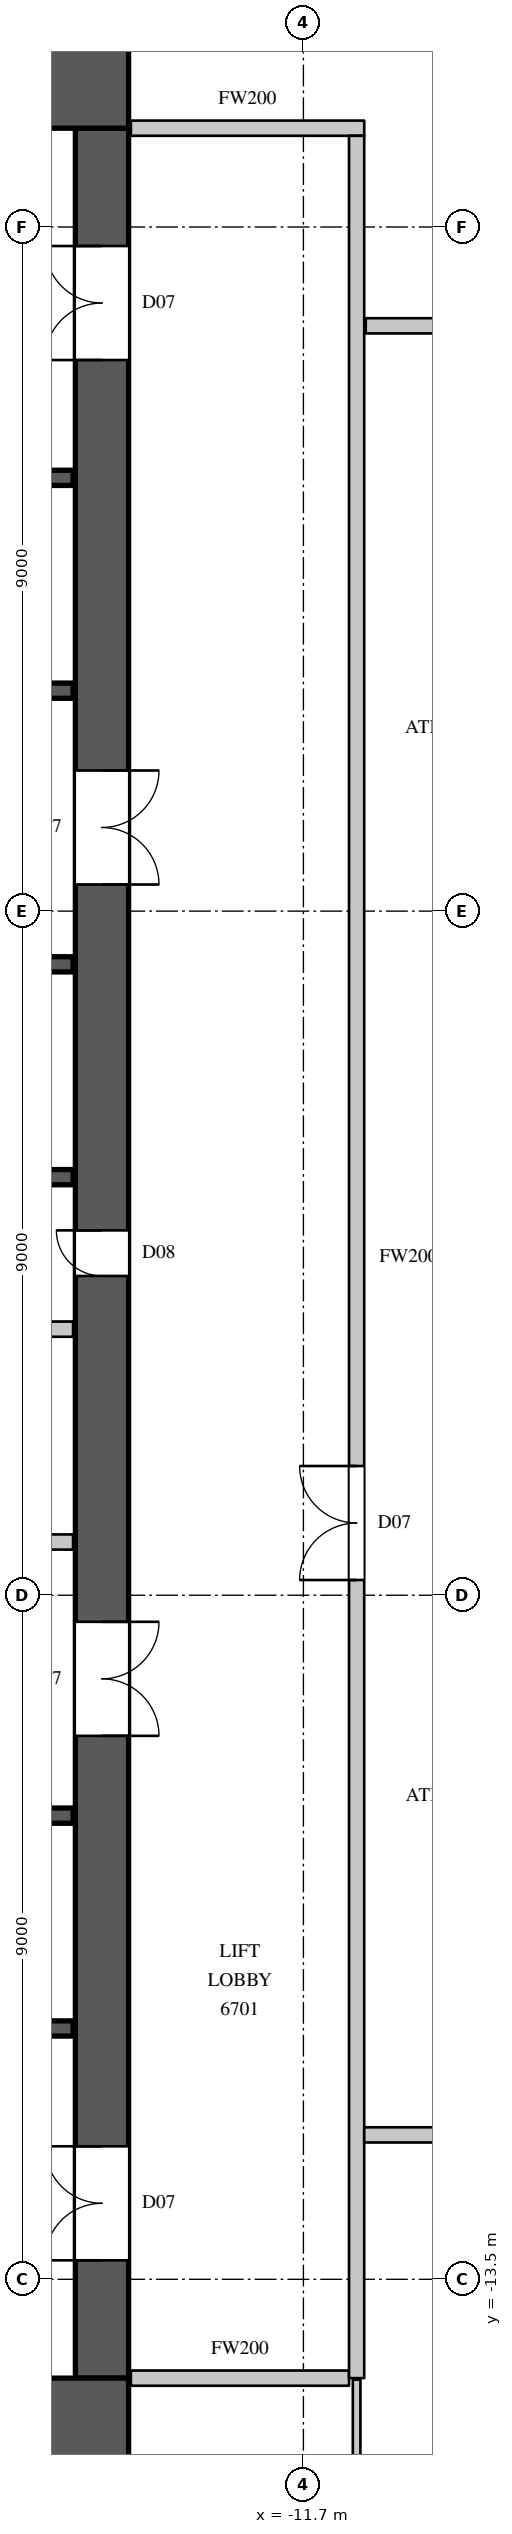
"""IFC4 building model, lengths in metres.
Left out: names, types, materials, properties, quantities, classifications, styles, units other than length and angle.
Written with IfcOpenShell. Run it as: python <this file> out.ifc"""

import sys

from ifc_helpers import new_model, si_unit, direction, frame, frame_2d, origin, place, context, subcontext, project, spatial, rectangle, extrude, element, fill, save


model = new_model("IFC4")
c1 = context("Model", 3, precision=1e-05, world=origin(), true_north=direction((0.0, 1.0)))
c2 = subcontext(c1, "Body", "Model", "MODEL_VIEW")
j1 = project(units=[si_unit("LENGTHUNIT", "METRE"), si_unit("PLANEANGLEUNIT", "RADIAN")], contexts=[c1])
p1 = place(None, origin())
s1 = spatial("IfcSite", under=j1, at=p1, CompositionType="ELEMENT")
p2 = place(p1, origin())
s2 = spatial("IfcBuilding", under=s1, at=p2, CompositionType="ELEMENT")
p3 = place(p2, frame((0.0, 0.0, 296.7)))
s3 = spatial("IfcBuildingStorey", under=s2, at=p3, CompositionType="ELEMENT", Elevation=296.7)
for number, where, z_axis, x_axis in (
    (1, (-30.0, 15.4, 0.0), (0.0, 0.0, 1.0), (1.0, 0.0, 0.0)),
    (2, (-30.0, -15.4, 0.0), (0.0, 0.0, 1.0), (1.0, 0.0, 0.0)),
):
    element("IfcWall", number, at=place(p3, frame(where, z_axis=z_axis, x_axis=x_axis)), inside=s3, PredefinedType="SHEAR", context=c2, shape_type="SweptSolid", body=[
        extrude(rectangle(XDim=16.0, YDim=1.2, at=frame_2d((8.0, 0.0))), origin(), (0.0, 0.0, 1.0), 4.1),
    ])
p4 = place(p3, frame((-14.35, -14.8, 0.0), z_axis=(0.0, 0.0, 1.0), x_axis=(0.0, 1.0, 0.0)))
e3 = element("IfcWall", 3, at=p4, inside=s3, PredefinedType="SHEAR", context=c2, shape_type="SweptSolid", body=[
    extrude(rectangle(XDim=29.6, YDim=0.7, at=frame_2d((14.8, 0.0))), origin(), (0.0, 0.0, 1.0), 4.1),
])
p5 = place(p4, frame((1.55, 0.0, 0.0)))
e4 = element("IfcOpeningElement", 4, at=p5, cuts=e3, PredefinedType="OPENING", context=c2, shape_type="SweptSolid", body=[
    extrude(rectangle(XDim=1.5, YDim=2.4, at=frame_2d((0.75, 1.2))), frame((0.0, 0.36, 0.0), z_axis=(0.0, -1.0, 0.0), x_axis=(1.0, 0.0, 0.0)), (0.0, 0.0, 1.0), 0.72),
])
p6 = place(p4, frame((26.55, 0.0, 0.0)))
e5 = element("IfcOpeningElement", 5, at=p6, cuts=e3, PredefinedType="OPENING", context=c2, shape_type="SweptSolid", body=[
    extrude(rectangle(XDim=1.5, YDim=2.4, at=frame_2d((0.75, 1.2))), frame((0.0, 0.36, 0.0), z_axis=(0.0, -1.0, 0.0), x_axis=(1.0, 0.0, 0.0)), (0.0, 0.0, 1.0), 0.72),
])
p7 = place(p4, frame((8.45, 0.0, 0.0)))
e6 = element("IfcOpeningElement", 6, at=p7, cuts=e3, PredefinedType="OPENING", context=c2, shape_type="SweptSolid", body=[
    extrude(rectangle(XDim=1.5, YDim=2.4, at=frame_2d((0.75, 1.2))), frame((0.0, 0.36, 0.0), z_axis=(0.0, -1.0, 0.0), x_axis=(1.0, 0.0, 0.0)), (0.0, 0.0, 1.0), 0.72),
])
p8 = place(p4, frame((19.65, 0.0, 0.0)))
e7 = element("IfcOpeningElement", 7, at=p8, cuts=e3, PredefinedType="OPENING", context=c2, shape_type="SweptSolid", body=[
    extrude(rectangle(XDim=1.5, YDim=2.4, at=frame_2d((0.75, 1.2))), frame((0.0, 0.36, 0.0), z_axis=(0.0, -1.0, 0.0), x_axis=(1.0, 0.0, 0.0)), (0.0, 0.0, 1.0), 0.72),
])
p9 = place(p4, frame((14.5, 0.0, 0.0)))
e8 = element("IfcOpeningElement", 8, at=p9, cuts=e3, PredefinedType="OPENING", context=c2, shape_type="SweptSolid", body=[
    extrude(rectangle(XDim=0.6, YDim=2.0, at=frame_2d((0.3, 1.0))), frame((0.0, 0.36, 0.0), z_axis=(0.0, -1.0, 0.0), x_axis=(1.0, 0.0, 0.0)), (0.0, 0.0, 1.0), 0.72),
])
p10 = place(p3, frame((-29.27, -3.8, 0.0), z_axis=(0.0, 0.0, 1.0), x_axis=(1.0, 0.0, 0.0)))
e9 = element("IfcWall", 9, at=p10, inside=s3, PredefinedType="PARTITIONING", context=c2, shape_type="SweptSolid", body=[
    extrude(rectangle(XDim=14.54, YDim=0.2, at=frame_2d((7.27, 0.0))), origin(), (0.0, 0.0, 1.0), 3.8),
])
p11 = place(p10, frame((3.25, 0.0, 0.0)))
e10 = element("IfcOpeningElement", 10, at=p11, cuts=e9, PredefinedType="OPENING", context=c2, shape_type="SweptSolid", body=[
    extrude(rectangle(XDim=0.9, YDim=2.2, at=frame_2d((0.45, 1.1))), frame((0.0, 0.11, 0.0), z_axis=(0.0, -1.0, 0.0), x_axis=(1.0, 0.0, 0.0)), (0.0, 0.0, 1.0), 0.22),
])
p12 = place(p10, frame((10.35, 0.0, 0.0)))
e11 = element("IfcOpeningElement", 11, at=p12, cuts=e9, PredefinedType="OPENING", context=c2, shape_type="SweptSolid", body=[
    extrude(rectangle(XDim=0.9, YDim=2.2, at=frame_2d((0.45, 1.1))), frame((0.0, 0.11, 0.0), z_axis=(0.0, -1.0, 0.0), x_axis=(1.0, 0.0, 0.0)), (0.0, 0.0, 1.0), 0.22),
])
p13 = place(p3, frame((-13.97, -14.8, 0.0), z_axis=(0.0, 0.0, 1.0), x_axis=(1.0, 0.0, 0.0)))
e12 = element("IfcWall", 12, at=p13, inside=s3, PredefinedType="PARTITIONING", context=c2, shape_type="SweptSolid", body=[
    extrude(rectangle(XDim=2.87, YDim=0.2, at=frame_2d((1.435, 0.0))), origin(), (0.0, 0.0, 1.0), 3.8),
])
p14 = place(p3, frame((-13.97, 14.8, 0.0), z_axis=(0.0, 0.0, 1.0), x_axis=(1.0, 0.0, 0.0)))
e13 = element("IfcWall", 13, at=p14, inside=s3, PredefinedType="PARTITIONING", context=c2, shape_type="SweptSolid", body=[
    extrude(rectangle(XDim=3.07, YDim=0.2, at=frame_2d((1.535, 0.0))), origin(), (0.0, 0.0, 1.0), 3.8),
])
p15 = place(p3, frame((-11.0, -14.8, 0.0), z_axis=(0.0, 0.0, 1.0), x_axis=(0.0, 1.0, 0.0)))
e14 = element("IfcWall", 14, at=p15, inside=s3, PredefinedType="PARTITIONING", context=c2, shape_type="SweptSolid", body=[
    extrude(rectangle(XDim=29.5, YDim=0.2, at=frame_2d((14.75, 0.0))), origin(), (0.0, 0.0, 1.0), 3.8),
])
p16 = place(p15, frame((10.5, 0.0, 0.0)))
e15 = element("IfcOpeningElement", 15, at=p16, cuts=e14, PredefinedType="OPENING", context=c2, shape_type="SweptSolid", body=[
    extrude(rectangle(XDim=1.5, YDim=2.4, at=frame_2d((0.75, 1.2))), frame((0.0, 0.11, 0.0), z_axis=(0.0, -1.0, 0.0), x_axis=(1.0, 0.0, 0.0)), (0.0, 0.0, 1.0), 0.22),
])
p17 = place(p3, frame((-10.9, -11.6, 0.0), z_axis=(0.0, 0.0, 1.0), x_axis=(1.0, 0.0, 0.0)))
e16 = element("IfcWall", 16, at=p17, inside=s3, PredefinedType="PARTITIONING", context=c2, shape_type="SweptSolid", body=[
    extrude(rectangle(XDim=13.421, YDim=0.2, at=frame_2d((6.71, 0.0))), origin(), (0.0, 0.0, 1.0), 3.8),
])
p18 = place(p17, frame((1.1, 0.0, 0.0)))
e17 = element("IfcOpeningElement", 17, at=p18, cuts=e16, PredefinedType="OPENING", context=c2, shape_type="SweptSolid", body=[
    extrude(rectangle(XDim=0.9, YDim=2.2, at=frame_2d((0.45, 1.1))), frame((0.0, 0.11, 0.0), z_axis=(0.0, -1.0, 0.0), x_axis=(1.0, 0.0, 0.0)), (0.0, 0.0, 1.0), 0.22),
])
p19 = place(p17, frame((4.9, 0.0, 0.0)))
e18 = element("IfcOpeningElement", 18, at=p19, cuts=e16, PredefinedType="OPENING", context=c2, shape_type="SweptSolid", body=[
    extrude(rectangle(XDim=0.9, YDim=2.2, at=frame_2d((0.45, 1.1))), frame((0.0, 0.11, 0.0), z_axis=(0.0, -1.0, 0.0), x_axis=(1.0, 0.0, 0.0)), (0.0, 0.0, 1.0), 0.22),
])
p20 = place(p17, frame((7.25, 0.0, 0.0)))
e19 = element("IfcOpeningElement", 19, at=p20, cuts=e16, PredefinedType="OPENING", context=c2, shape_type="SweptSolid", body=[
    extrude(rectangle(XDim=0.9, YDim=2.2, at=frame_2d((0.45, 1.1))), frame((0.0, 0.11, 0.0), z_axis=(0.0, -1.0, 0.0), x_axis=(1.0, 0.0, 0.0)), (0.0, 0.0, 1.0), 0.22),
])
p21 = place(p17, frame((9.9, 0.0, 0.0)))
e20 = element("IfcOpeningElement", 20, at=p21, cuts=e16, PredefinedType="OPENING", context=c2, shape_type="SweptSolid", body=[
    extrude(rectangle(XDim=1.1, YDim=2.4, at=frame_2d((0.55, 1.2))), frame((0.0, 0.11, 0.0), z_axis=(0.0, -1.0, 0.0), x_axis=(1.0, 0.0, 0.0)), (0.0, 0.0, 1.0), 0.22),
])
p22 = place(p3, frame((-10.88, 12.2, 0.0), z_axis=(0.0, 0.0, 1.0), x_axis=(1.0, 0.0, 0.0)))
e21 = element("IfcWall", 21, at=p22, inside=s3, PredefinedType="PARTITIONING", context=c2, shape_type="SweptSolid", body=[
    extrude(rectangle(XDim=3.736, YDim=0.2, at=frame_2d((1.868, 0.0))), origin(), (0.0, 0.0, 1.0), 3.8),
])
p23 = place(p22, frame((1.9, 0.0, 0.0)))
e22 = element("IfcOpeningElement", 22, at=p23, cuts=e21, PredefinedType="OPENING", context=c2, shape_type="SweptSolid", body=[
    extrude(rectangle(XDim=1.1, YDim=2.4, at=frame_2d((0.55, 1.2))), frame((0.0, 0.11, 0.0), z_axis=(0.0, -1.0, 0.0), x_axis=(1.0, 0.0, 0.0)), (0.0, 0.0, 1.0), 0.22),
])
p24 = place(p3, frame((-29.27, -1.0, 0.0), z_axis=(0.0, 0.0, 1.0), x_axis=(1.0, 0.0, 0.0)))
e23 = element("IfcWall", 23, at=p24, inside=s3, PredefinedType="PARTITIONING", context=c2, shape_type="SweptSolid", body=[
    extrude(rectangle(XDim=14.54, YDim=0.2, at=frame_2d((7.27, 0.0))), origin(), (0.0, 0.0, 1.0), 3.8),
])
p25 = place(p3, frame((-17.92, -10.2, 0.0), z_axis=(0.0, 0.0, 1.0), x_axis=(1.0, 0.0, 0.0)))
e24 = element("IfcWall", 24, at=p25, inside=s3, PredefinedType="SHEAR", context=c2, shape_type="SweptSolid", body=[
    extrude(rectangle(XDim=3.19, YDim=0.2, at=frame_2d((1.595, 0.0))), origin(), (0.0, 0.0, 1.0), 3.8),
])
p26 = place(p25, frame((1.05, 0.0, 0.0)))
e25 = element("IfcOpeningElement", 25, at=p26, cuts=e24, PredefinedType="OPENING", context=c2, shape_type="SweptSolid", body=[
    extrude(rectangle(XDim=1.1, YDim=2.2, at=frame_2d((0.55, 1.1))), frame((0.0, 0.11, 0.0), z_axis=(0.0, -1.0, 0.0), x_axis=(1.0, 0.0, 0.0)), (0.0, 0.0, 1.0), 0.22),
])
p27 = place(p3, frame((-17.92, -7.4, 0.0), z_axis=(0.0, 0.0, 1.0), x_axis=(1.0, 0.0, 0.0)))
e26 = element("IfcWall", 26, at=p27, inside=s3, PredefinedType="SHEAR", context=c2, shape_type="SweptSolid", body=[
    extrude(rectangle(XDim=3.19, YDim=0.2, at=frame_2d((1.595, 0.0))), origin(), (0.0, 0.0, 1.0), 3.8),
])
p28 = place(p3, frame((-17.9, 1.0, 0.0), z_axis=(0.0, 0.0, 1.0), x_axis=(1.0, 0.0, 0.0)))
e27 = element("IfcWall", 27, at=p28, inside=s3, PredefinedType="SHEAR", context=c2, shape_type="SweptSolid", body=[
    extrude(rectangle(XDim=3.17, YDim=0.2, at=frame_2d((1.585, 0.0))), origin(), (0.0, 0.0, 1.0), 3.8),
])
p29 = place(p3, frame((-17.9, 3.8, 0.0), z_axis=(0.0, 0.0, 1.0), x_axis=(1.0, 0.0, 0.0)))
e28 = element("IfcWall", 28, at=p29, inside=s3, PredefinedType="SHEAR", context=c2, shape_type="SweptSolid", body=[
    extrude(rectangle(XDim=3.17, YDim=0.2, at=frame_2d((1.585, 0.0))), origin(), (0.0, 0.0, 1.0), 3.8),
])
p30 = place(p29, frame((1.05, 0.0, 0.0)))
e29 = element("IfcOpeningElement", 29, at=p30, cuts=e28, PredefinedType="OPENING", context=c2, shape_type="SweptSolid", body=[
    extrude(rectangle(XDim=1.1, YDim=2.2, at=frame_2d((0.55, 1.1))), frame((0.0, 0.11, 0.0), z_axis=(0.0, -1.0, 0.0), x_axis=(1.0, 0.0, 0.0)), (0.0, 0.0, 1.0), 0.22),
])
p31 = place(p3, frame((-17.92, 7.4, 0.0), z_axis=(0.0, 0.0, 1.0), x_axis=(1.0, 0.0, 0.0)))
e30 = element("IfcWall", 30, at=p31, inside=s3, PredefinedType="SHEAR", context=c2, shape_type="SweptSolid", body=[
    extrude(rectangle(XDim=3.19, YDim=0.2, at=frame_2d((1.595, 0.0))), origin(), (0.0, 0.0, 1.0), 3.8),
])
p32 = place(p3, frame((-17.92, 10.2, 0.0), z_axis=(0.0, 0.0, 1.0), x_axis=(1.0, 0.0, 0.0)))
e31 = element("IfcWall", 31, at=p32, inside=s3, PredefinedType="SHEAR", context=c2, shape_type="SweptSolid", body=[
    extrude(rectangle(XDim=3.19, YDim=0.2, at=frame_2d((1.595, 0.0))), origin(), (0.0, 0.0, 1.0), 3.8),
])
p33 = place(p32, frame((1.05, 0.0, 0.0)))
e32 = element("IfcOpeningElement", 32, at=p33, cuts=e31, PredefinedType="OPENING", context=c2, shape_type="SweptSolid", body=[
    extrude(rectangle(XDim=1.1, YDim=2.2, at=frame_2d((0.55, 1.1))), frame((0.0, 0.11, 0.0), z_axis=(0.0, -1.0, 0.0), x_axis=(1.0, 0.0, 0.0)), (0.0, 0.0, 1.0), 0.22),
])
p34 = place(p3, frame((-11.0, -23.757, 0.0), z_axis=(0.0, 0.0, 1.0), x_axis=(0.0, 1.0, 0.0)))
e33 = element("IfcWall", 33, at=p34, inside=s3, PredefinedType="PARTITIONING", context=c2, shape_type="SweptSolid", body=[
    extrude(rectangle(XDim=8.937, YDim=0.1, at=frame_2d((4.468, 0.0))), origin(), (0.0, 0.0, 1.0), 3.8),
])
p35 = place(p16, origin())
e34 = element("IfcDoor", 34, at=p35, inside=s3, OperationType="DOUBLE_DOOR_SINGLE_SWING", PredefinedType="DOOR", context=c2, shape_type="SweptSolid", body=[
    extrude(rectangle(XDim=1.5, YDim=2.4, at=frame_2d((0.75, 1.2))), frame((0.0, 0.025, 0.0), z_axis=(0.0, -1.0, 0.0), x_axis=(1.0, 0.0, 0.0)), (0.0, 0.0, 1.0), 0.05),
])
fill(e15, e34)
p36 = place(p5, origin())
e35 = element("IfcDoor", 35, at=p36, inside=s3, OperationType="DOUBLE_DOOR_SINGLE_SWING", PredefinedType="DOOR", context=c2, shape_type="SweptSolid", body=[
    extrude(rectangle(XDim=1.5, YDim=2.4, at=frame_2d((0.75, 1.2))), frame((0.0, 0.345, 0.0), z_axis=(0.0, -1.0, 0.0), x_axis=(1.0, 0.0, 0.0)), (0.0, 0.0, 1.0), 0.05),
])
fill(e4, e35)
p37 = place(p6, origin())
e36 = element("IfcDoor", 36, at=p37, inside=s3, OperationType="DOUBLE_DOOR_SINGLE_SWING", PredefinedType="DOOR", context=c2, shape_type="SweptSolid", body=[
    extrude(rectangle(XDim=1.5, YDim=2.4, at=frame_2d((0.75, 1.2))), frame((0.0, 0.345, 0.0), z_axis=(0.0, -1.0, 0.0), x_axis=(1.0, 0.0, 0.0)), (0.0, 0.0, 1.0), 0.05),
])
fill(e5, e36)
p38 = place(p7, origin())
e37 = element("IfcDoor", 37, at=p38, inside=s3, OperationType="DOUBLE_DOOR_SINGLE_SWING", PredefinedType="DOOR", context=c2, shape_type="SweptSolid", body=[
    extrude(rectangle(XDim=1.5, YDim=2.4, at=frame_2d((0.75, 1.2))), frame((0.0, -0.295, 0.0), z_axis=(0.0, -1.0, 0.0), x_axis=(1.0, 0.0, 0.0)), (0.0, 0.0, 1.0), 0.05),
])
fill(e6, e37)
p39 = place(p8, origin())
e38 = element("IfcDoor", 38, at=p39, inside=s3, OperationType="DOUBLE_DOOR_SINGLE_SWING", PredefinedType="DOOR", context=c2, shape_type="SweptSolid", body=[
    extrude(rectangle(XDim=1.5, YDim=2.4, at=frame_2d((0.75, 1.2))), frame((0.0, -0.295, 0.0), z_axis=(0.0, -1.0, 0.0), x_axis=(1.0, 0.0, 0.0)), (0.0, 0.0, 1.0), 0.05),
])
fill(e7, e38)
p40 = place(p9, origin())
e39 = element("IfcDoor", 39, at=p40, inside=s3, OperationType="SINGLE_SWING_RIGHT", PredefinedType="DOOR", context=c2, shape_type="SweptSolid", body=[
    extrude(rectangle(XDim=0.6, YDim=2.0, at=frame_2d((0.3, 1.0))), frame((0.0, 0.345, 0.0), z_axis=(0.0, -1.0, 0.0), x_axis=(1.0, 0.0, 0.0)), (0.0, 0.0, 1.0), 0.05),
])
fill(e8, e39)
save(model, sys.argv[1])
